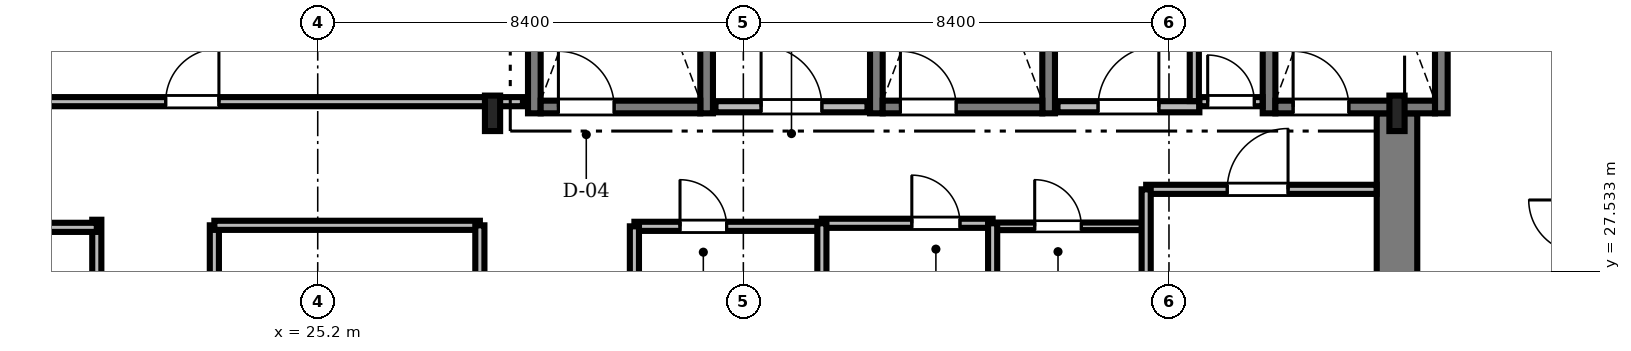
"""IFC4 building model, lengths in metres.
Left out: names, types, materials, properties, quantities, classifications, styles, units other than length and angle.
Written with IfcOpenShell. Run it as: python <this file> out.ifc"""

import sys

from ifc_helpers import new_model, si_unit, direction, frame, frame_2d, origin, origin_2d, place, context, subcontext, project, spatial, rectangle, i_section, extrude, source, transform, mapped, element, fill, save


model = new_model("IFC4")
c1 = context("Model", 3, precision=1e-05, world=origin(), true_north=direction((0.0, 1.0)))
c2 = subcontext(c1, "Body", "Model", "MODEL_VIEW")
j1 = project(units=[si_unit("LENGTHUNIT", "METRE"), si_unit("PLANEANGLEUNIT", "RADIAN")], contexts=[c1])
p1 = place(None, origin())
s1 = spatial("IfcSite", under=j1, at=p1, CompositionType="ELEMENT")
p2 = place(p1, origin())
s2 = spatial("IfcBuilding", under=s1, at=p2, CompositionType="ELEMENT")
p3 = place(p2, frame((0.0, 0.0, 218.55)))
s3 = spatial("IfcBuildingStorey", under=s2, at=p3, CompositionType="ELEMENT", Elevation=218.55)
m1 = source(origin(), c2, "Body", "SweptSolid", [
    extrude(rectangle(XDim=13.15, YDim=0.8, at=frame_2d((6.575, 0.0))), origin(), (0.0, 0.0, 1.0), 3.53),
])
p4 = place(p3, frame((46.5, 17.5, 0.0), z_axis=(0.0, 0.0, 1.0), x_axis=(0.0, 1.0, 0.0)))
e1 = element("IfcWall", 1, at=p4, inside=s3, PredefinedType="SHEAR", context=c2, shape_type="MappedRepresentation", body=[
    mapped(m1, transform((0.0, 0.0, 0.0), scale=1.0)),
])
m2 = source(origin(), c2, "Body", "SweptSolid", [
    extrude(i_section(OverallWidth=0.3, OverallDepth=0.7, WebThickness=0.017, FlangeThickness=0.032, FilletRadius=0.027, at=origin_2d()), origin(), (0.0, 0.0, 1.0), 3.53),
])
for number, where, z_axis, x_axis in (
    (2, (28.65, 30.65, 0.0), (0.0, 0.0, 1.0), (1.0, 0.0, 0.0)),
    (3, (46.5, 30.65, 0.0), (0.0, 0.0, 1.0), (1.0, 0.0, 0.0)),
):
    element("IfcColumn", number, at=place(p3, frame(where, z_axis=z_axis, x_axis=x_axis)), inside=s3, PredefinedType="COLUMN", context=c2, shape_type="MappedRepresentation", body=[
        mapped(m2, transform((0.0, 0.0, 0.0), scale=1.0)),
    ])
m3 = source(origin(), c2, "Body", "SweptSolid", [
    extrude(rectangle(XDim=9.25, YDim=0.25, at=frame_2d((4.625, 0.0))), origin(), (0.0, 0.0, 1.0), 3.55),
])
for number, where, z_axis, x_axis in (
    (4, (29.475, 30.65, 0.0), (0.0, 0.0, 1.0), (0.0, 1.0, 0.0)),
    (5, (32.875, 30.65, 0.0), (0.0, 0.0, 1.0), (0.0, 1.0, 0.0)),
):
    element("IfcWall", number, at=place(p3, frame(where, z_axis=z_axis, x_axis=x_axis)), inside=s3, PredefinedType="SOLIDWALL", context=c2, shape_type="MappedRepresentation", body=[
        mapped(m3, transform((0.0, 0.0, 0.0), scale=1.0)),
    ])
m4 = source(origin(), c2, "Body", "SweptSolid", [
    extrude(rectangle(XDim=3.15, YDim=0.25, at=frame_2d((1.575, 0.0))), origin(), (0.0, 0.0, 1.0), 3.55),
])
p5 = place(p3, frame((29.6, 30.775, 0.0), z_axis=(0.0, 0.0, 1.0), x_axis=(1.0, 0.0, 0.0)))
e6 = element("IfcWall", 6, at=p5, inside=s3, PredefinedType="SOLIDWALL", context=c2, shape_type="MappedRepresentation", body=[
    mapped(m4, transform((0.0, 0.0, 0.0), scale=1.0)),
])
m5 = source(origin(), c2, "Body", "SweptSolid", [
    extrude(rectangle(XDim=1.1, YDim=2.2, at=frame_2d((0.55, 1.1))), frame((0.0, 0.135, 0.0), z_axis=(0.0, -1.0, 0.0), x_axis=(1.0, 0.0, 0.0)), (0.0, 0.0, 1.0), 0.27),
])
p6 = place(p5, frame((0.35, 0.0, 0.0)))
e7 = element("IfcOpeningElement", 7, at=p6, cuts=e6, PredefinedType="OPENING", context=c2, shape_type="MappedRepresentation", body=[
    mapped(m5, transform((0.0, 0.0, 0.0), scale=1.0)),
])
for number, where, z_axis, x_axis in (
    (8, (36.225, 30.65, 0.0), (0.0, 0.0, 1.0), (0.0, 1.0, 0.0)),
    (9, (39.625, 30.65, 0.0), (0.0, 0.0, 1.0), (0.0, 1.0, 0.0)),
):
    element("IfcWall", number, at=place(p3, frame(where, z_axis=z_axis, x_axis=x_axis)), inside=s3, PredefinedType="SOLIDWALL", context=c2, shape_type="MappedRepresentation", body=[
        mapped(m3, transform((0.0, 0.0, 0.0), scale=1.0)),
    ])
p7 = place(p3, frame((36.35, 30.775, 0.0), z_axis=(0.0, 0.0, 1.0), x_axis=(1.0, 0.0, 0.0)))
e10 = element("IfcWall", 10, at=p7, inside=s3, PredefinedType="SOLIDWALL", context=c2, shape_type="MappedRepresentation", body=[
    mapped(m4, transform((0.0, 0.0, 0.0), scale=1.0)),
])
p8 = place(p7, frame((0.35, 0.0, 0.0)))
e11 = element("IfcOpeningElement", 11, at=p8, cuts=e10, PredefinedType="OPENING", context=c2, shape_type="MappedRepresentation", body=[
    mapped(m5, transform((0.0, 0.0, 0.0), scale=1.0)),
])
for number, where, z_axis, x_axis in (
    (12, (43.975, 30.65, 0.0), (0.0, 0.0, 1.0), (0.0, 1.0, 0.0)),
    (13, (47.375, 30.65, 0.0), (0.0, 0.0, 1.0), (0.0, 1.0, 0.0)),
):
    element("IfcWall", number, at=place(p3, frame(where, z_axis=z_axis, x_axis=x_axis)), inside=s3, PredefinedType="SOLIDWALL", context=c2, shape_type="MappedRepresentation", body=[
        mapped(m3, transform((0.0, 0.0, 0.0), scale=1.0)),
    ])
p9 = place(p3, frame((44.1, 30.775, 0.0), z_axis=(0.0, 0.0, 1.0), x_axis=(1.0, 0.0, 0.0)))
e14 = element("IfcWall", 14, at=p9, inside=s3, PredefinedType="SOLIDWALL", context=c2, shape_type="MappedRepresentation", body=[
    mapped(m4, transform((0.0, 0.0, 0.0), scale=1.0)),
])
p10 = place(p9, frame((0.35, 0.0, 0.0)))
e15 = element("IfcOpeningElement", 15, at=p10, cuts=e14, PredefinedType="OPENING", context=c2, shape_type="MappedRepresentation", body=[
    mapped(m5, transform((0.0, 0.0, 0.0), scale=1.0)),
])
m6 = source(origin(), c2, "Body", "SweptSolid", [
    extrude(rectangle(XDim=3.0, YDim=0.22, at=frame_2d((1.5, 0.0))), origin(), (0.0, 0.0, 1.0), 3.53),
])
p11 = place(p3, frame((33.05, 30.78, 0.0), z_axis=(0.0, 0.0, 1.0), x_axis=(1.0, 0.0, 0.0)))
e16 = element("IfcWall", 16, at=p11, inside=s3, PredefinedType="SOLIDWALL", context=c2, shape_type="MappedRepresentation", body=[
    mapped(m6, transform((0.0, 0.0, 0.0), scale=1.0)),
])
m7 = source(origin(), c2, "Body", "SweptSolid", [
    extrude(rectangle(XDim=1.2, YDim=2.2, at=frame_2d((0.6, 1.1))), frame((0.0, 0.12, 0.0), z_axis=(0.0, -1.0, 0.0), x_axis=(1.0, 0.0, 0.0)), (0.0, 0.0, 1.0), 0.24),
])
p12 = place(p11, frame((0.9, 0.0, 0.0)))
e17 = element("IfcOpeningElement", 17, at=p12, cuts=e16, PredefinedType="OPENING", context=c2, shape_type="MappedRepresentation", body=[
    mapped(m7, transform((0.0, 0.0, 0.0), scale=1.0)),
])
m8 = source(origin(), c2, "Body", "SweptSolid", [
    extrude(rectangle(XDim=2.8, YDim=0.22, at=frame_2d((1.4, 0.0))), origin(), (0.0, 0.0, 1.0), 3.53),
])
p13 = place(p3, frame((39.8, 30.78, 0.0), z_axis=(0.0, 0.0, 1.0), x_axis=(1.0, 0.0, 0.0)))
e18 = element("IfcWall", 18, at=p13, inside=s3, PredefinedType="SOLIDWALL", context=c2, shape_type="MappedRepresentation", body=[
    mapped(m8, transform((0.0, 0.0, 0.0), scale=1.0)),
])
p14 = place(p13, frame((0.8, 0.0, 0.0)))
e19 = element("IfcOpeningElement", 19, at=p14, cuts=e18, PredefinedType="OPENING", context=c2, shape_type="MappedRepresentation", body=[
    mapped(m7, transform((0.0, 0.0, 0.0), scale=1.0)),
])
m9 = source(origin(), c2, "Body", "SweptSolid", [
    extrude(rectangle(XDim=17.828, YDim=0.18, at=frame_2d((8.914, 0.0))), origin(), (0.0, 0.0, 1.0), 2.772),
])
p15 = place(p3, frame((11.422, 30.88, 0.0), z_axis=(0.0, 0.0, 1.0), x_axis=(1.0, 0.0, 0.0)))
e20 = element("IfcWall", 20, at=p15, inside=s3, PredefinedType="PARTITIONING", context=c2, shape_type="MappedRepresentation", body=[
    mapped(m9, transform((0.0, 0.0, 0.0), scale=1.0)),
])
m10 = source(origin(), c2, "Body", "SweptSolid", [
    extrude(rectangle(XDim=1.05, YDim=2.2, at=frame_2d((0.525, 1.1))), frame((0.0, 0.1, 0.0), z_axis=(0.0, -1.0, 0.0), x_axis=(1.0, 0.0, 0.0)), (0.0, 0.0, 1.0), 0.2),
])
p16 = place(p15, frame((10.778, 0.0, 0.0)))
e21 = element("IfcOpeningElement", 21, at=p16, cuts=e20, PredefinedType="OPENING", context=c2, shape_type="MappedRepresentation", body=[
    mapped(m10, transform((0.0, 0.0, 0.0), scale=1.0)),
])
m11 = source(origin(), c2, "Body", "SweptSolid", [
    extrude(rectangle(XDim=14.98, YDim=0.18, at=frame_2d((7.49, 0.0))), origin(), (0.0, 0.0, 1.0), 2.972),
])
p17 = place(p3, frame((20.84, 13.57, 0.0), z_axis=(0.0, 0.0, 1.0), x_axis=(0.0, 1.0, 0.0)))
e22 = element("IfcWall", 22, at=p17, inside=s3, PredefinedType="PARTITIONING", context=c2, shape_type="MappedRepresentation", body=[
    mapped(m11, transform((0.0, 0.0, 0.0), scale=1.0)),
])
p18 = place(p17, frame((1.952, 0.0, 0.0)))
e23 = element("IfcOpeningElement", 23, at=p18, cuts=e22, PredefinedType="OPENING", context=c2, shape_type="MappedRepresentation", body=[
    mapped(m10, transform((0.0, 0.0, 0.0), scale=1.0)),
])
m12 = source(origin(), c2, "Body", "SweptSolid", [
    extrude(rectangle(XDim=0.95, YDim=2.15, at=frame_2d((0.475, 1.075))), frame((0.0, 0.1, 0.0), z_axis=(0.0, -1.0, 0.0), x_axis=(1.0, 0.0, 0.0)), (0.0, 0.0, 1.0), 0.2),
])
p19 = place(p17, frame((8.12, 0.0, 0.0)))
e24 = element("IfcOpeningElement", 24, at=p19, cuts=e22, PredefinedType="OPENING", context=c2, shape_type="MappedRepresentation", body=[
    mapped(m12, transform((0.0, 0.0, 0.0), scale=1.0)),
])
p20 = place(p17, frame((11.838, 0.0, 0.0)))
e25 = element("IfcOpeningElement", 25, at=p20, cuts=e22, PredefinedType="OPENING", context=c2, shape_type="MappedRepresentation", body=[
    mapped(m10, transform((0.0, 0.0, 0.0), scale=1.0)),
])
m13 = source(origin(), c2, "Body", "SweptSolid", [
    extrude(rectangle(XDim=4.548, YDim=0.18, at=frame_2d((2.274, 0.0))), origin(), (0.0, 0.0, 1.0), 3.162),
])
p21 = place(p3, frame((41.55, 29.15, 0.0), z_axis=(0.0, 0.0, 1.0), x_axis=(1.0, 0.0, 0.0)))
e26 = element("IfcWall", 26, at=p21, inside=s3, PredefinedType="PARTITIONING", context=c2, shape_type="MappedRepresentation", body=[
    mapped(m13, transform((0.0, 0.0, 0.0), scale=1.0)),
])
m14 = source(origin(), c2, "Body", "SweptSolid", [
    extrude(rectangle(XDim=1.2, YDim=2.2, at=frame_2d((0.6, 1.1))), frame((0.0, 0.1, 0.0), z_axis=(0.0, -1.0, 0.0), x_axis=(1.0, 0.0, 0.0)), (0.0, 0.0, 1.0), 0.2),
])
p22 = place(p21, frame((1.6, 0.0, 0.0)))
e27 = element("IfcOpeningElement", 27, at=p22, cuts=e26, PredefinedType="OPENING", context=c2, shape_type="MappedRepresentation", body=[
    mapped(m14, transform((0.0, 0.0, 0.0), scale=1.0)),
])
m15 = source(origin(), c2, "Body", "SweptSolid", [
    extrude(rectangle(XDim=4.24, YDim=0.18, at=frame_2d((2.12, 0.0))), origin(), (0.0, 0.0, 1.0), 2.972),
])
p23 = place(p3, frame((23.16, 24.2, 0.0), z_axis=(0.0, 0.0, 1.0), x_axis=(0.0, 1.0, 0.0)))
e28 = element("IfcWall", 28, at=p23, inside=s3, PredefinedType="PARTITIONING", context=c2, shape_type="MappedRepresentation", body=[
    mapped(m15, transform((0.0, 0.0, 0.0), scale=1.0)),
])
p24 = place(p23, frame((1.4, 0.0, 0.0)))
e29 = element("IfcOpeningElement", 29, at=p24, cuts=e28, PredefinedType="OPENING", context=c2, shape_type="MappedRepresentation", body=[
    mapped(m10, transform((0.0, 0.0, 0.0), scale=1.0)),
])
m16 = source(origin(), c2, "Body", "SweptSolid", [
    extrude(rectangle(XDim=3.7, YDim=0.18, at=frame_2d((1.85, 0.0))), origin(), (0.0, 0.0, 1.0), 3.162),
])
p25 = place(p3, frame((31.45, 28.42, 0.0), z_axis=(0.0, 0.0, 1.0), x_axis=(1.0, 0.0, 0.0)))
e30 = element("IfcWall", 30, at=p25, inside=s3, PredefinedType="PARTITIONING", context=c2, shape_type="MappedRepresentation", body=[
    mapped(m16, transform((0.0, 0.0, 0.0), scale=1.0)),
])
m17 = source(origin(), c2, "Body", "SweptSolid", [
    extrude(rectangle(XDim=0.92, YDim=2.1, at=frame_2d((0.46, 1.05))), frame((0.0, 0.1, 0.0), z_axis=(0.0, -1.0, 0.0), x_axis=(1.0, 0.0, 0.0)), (0.0, 0.0, 1.0), 0.2),
])
p26 = place(p25, frame((0.9, 0.0, 0.0)))
e31 = element("IfcOpeningElement", 31, at=p26, cuts=e30, PredefinedType="OPENING", context=c2, shape_type="MappedRepresentation", body=[
    mapped(m17, transform((0.0, 0.0, 0.0), scale=1.0)),
])
m18 = source(origin(), c2, "Body", "SweptSolid", [
    extrude(rectangle(XDim=3.37, YDim=0.18, at=frame_2d((1.685, 0.0))), origin(), (0.0, 0.0, 1.0), 3.53),
])
p27 = place(p3, frame((35.15, 28.48, 0.0), z_axis=(0.0, 0.0, 1.0), x_axis=(1.0, 0.0, 0.0)))
e32 = element("IfcWall", 32, at=p27, inside=s3, PredefinedType="PARTITIONING", context=c2, shape_type="MappedRepresentation", body=[
    mapped(m18, transform((0.0, 0.0, 0.0), scale=1.0)),
])
p28 = place(p27, frame((1.775, 0.0, 0.0)))
e33 = element("IfcOpeningElement", 33, at=p28, cuts=e32, PredefinedType="OPENING", context=c2, shape_type="MappedRepresentation", body=[
    mapped(m12, transform((0.0, 0.0, 0.0), scale=1.0)),
])
m19 = source(origin(), c2, "Body", "SweptSolid", [
    extrude(rectangle(XDim=3.0, YDim=0.15, at=frame_2d((1.5, 0.0))), origin(), (0.0, 0.0, 1.0), 3.53),
])
p29 = place(p3, frame((38.52, 28.42, 0.0), z_axis=(0.0, 0.0, 1.0), x_axis=(1.0, 0.0, 0.0)))
e34 = element("IfcWall", 34, at=p29, inside=s3, PredefinedType="PARTITIONING", context=c2, shape_type="MappedRepresentation", body=[
    mapped(m19, transform((0.0, 0.0, 0.0), scale=1.0)),
])
m20 = source(origin(), c2, "Body", "SweptSolid", [
    extrude(rectangle(XDim=0.92, YDim=2.1, at=frame_2d((0.46, 1.05))), frame((0.0, 0.085, 0.0), z_axis=(0.0, -1.0, 0.0), x_axis=(1.0, 0.0, 0.0)), (0.0, 0.0, 1.0), 0.17),
])
p30 = place(p29, frame((0.83, 0.0, 0.0)))
e35 = element("IfcOpeningElement", 35, at=p30, cuts=e34, PredefinedType="OPENING", context=c2, shape_type="MappedRepresentation", body=[
    mapped(m20, transform((0.0, 0.0, 0.0), scale=1.0)),
])
m21 = source(origin(), c2, "Body", "SweptSolid", [
    extrude(rectangle(XDim=1.248, YDim=0.18, at=frame_2d((0.624, 0.0))), origin(), (0.0, 0.0, 1.0), 3.53),
])
p31 = place(p3, frame((42.6, 30.88, 0.0), z_axis=(0.0, 0.0, 1.0), x_axis=(1.0, 0.0, 0.0)))
e36 = element("IfcWall", 36, at=p31, inside=s3, PredefinedType="PARTITIONING", context=c2, shape_type="MappedRepresentation", body=[
    mapped(m21, transform((0.0, 0.0, 0.0), scale=1.0)),
])
p32 = place(p31, frame((0.164, 0.0, 0.0)))
e37 = element("IfcOpeningElement", 37, at=p32, cuts=e36, PredefinedType="OPENING", context=c2, shape_type="MappedRepresentation", body=[
    mapped(m17, transform((0.0, 0.0, 0.0), scale=1.0)),
])
m22 = source(origin(), c2, "Body", "SweptSolid", [
    extrude(rectangle(XDim=9.61, YDim=0.18, at=frame_2d((4.805, 0.0))), origin(), (0.0, 0.0, 1.0), 2.772),
])
p33 = place(p3, frame((11.23, 28.4, 0.0), z_axis=(0.0, 0.0, 1.0), x_axis=(1.0, 0.0, 0.0)))
e38 = element("IfcWall", 38, at=p33, inside=s3, PredefinedType="PARTITIONING", context=c2, shape_type="MappedRepresentation", body=[
    mapped(m22, transform((0.0, 0.0, 0.0), scale=1.0)),
])
m23 = source(origin(), c2, "Body", "SweptSolid", [
    extrude(rectangle(XDim=5.24, YDim=0.18, at=frame_2d((2.62, 0.0))), origin(), (0.0, 0.0, 1.0), 3.53),
])
p34 = place(p3, frame((23.16, 28.44, 0.0), z_axis=(0.0, 0.0, 1.0), x_axis=(1.0, 0.0, 0.0)))
e39 = element("IfcWall", 39, at=p34, inside=s3, PredefinedType="PARTITIONING", context=c2, shape_type="MappedRepresentation", body=[
    mapped(m23, transform((0.0, 0.0, 0.0), scale=1.0)),
])
p35 = place(p3, frame((28.4, 24.2, 0.0), z_axis=(0.0, 0.0, 1.0), x_axis=(0.0, 1.0, 0.0)))
e40 = element("IfcWall", 40, at=p35, inside=s3, PredefinedType="PARTITIONING", context=c2, shape_type="MappedRepresentation", body=[
    mapped(m15, transform((0.0, 0.0, 0.0), scale=1.0)),
])
m24 = source(origin(), c2, "Body", "SweptSolid", [
    extrude(rectangle(XDim=2.35, YDim=0.18, at=frame_2d((1.175, 0.0))), origin(), (0.0, 0.0, 1.0), 2.972),
])
p36 = place(p3, frame((41.55, 26.8, 0.0), z_axis=(0.0, 0.0, 1.0), x_axis=(0.0, 1.0, 0.0)))
e41 = element("IfcWall", 41, at=p36, inside=s3, PredefinedType="PARTITIONING", context=c2, shape_type="MappedRepresentation", body=[
    mapped(m24, transform((0.0, 0.0, 0.0), scale=1.0)),
])
m25 = source(origin(), c2, "Body", "SweptSolid", [
    extrude(rectangle(XDim=1.858, YDim=0.18, at=frame_2d((0.929, 0.0))), origin(), (0.0, 0.0, 1.0), 3.53),
])
p37 = place(p3, frame((42.5, 30.892, 0.0), z_axis=(0.0, 0.0, 1.0), x_axis=(0.0, 1.0, 0.0)))
e42 = element("IfcWall", 42, at=p37, inside=s3, PredefinedType="PARTITIONING", context=c2, shape_type="MappedRepresentation", body=[
    mapped(m25, transform((0.0, 0.0, 0.0), scale=1.0)),
])
m26 = source(origin(), c2, "Body", "SweptSolid", [
    extrude(rectangle(XDim=1.66, YDim=0.18, at=frame_2d((0.83, 0.0))), origin(), (0.0, 0.0, 1.0), 3.072),
])
for number, where, z_axis, x_axis in (
    (43, (35.15, 26.82, 0.0), (0.0, 0.0, 1.0), (0.0, 1.0, 0.0)),
    (44, (38.52, 26.82, 0.0), (0.0, 0.0, 1.0), (0.0, 1.0, 0.0)),
):
    element("IfcWall", number, at=place(p3, frame(where, z_axis=z_axis, x_axis=x_axis)), inside=s3, PredefinedType="PARTITIONING", context=c2, shape_type="MappedRepresentation", body=[
        mapped(m26, transform((0.0, 0.0, 0.0), scale=1.0)),
    ])
m27 = source(origin(), c2, "Body", "SweptSolid", [
    extrude(rectangle(XDim=1.6, YDim=0.18, at=frame_2d((0.8, 0.0))), origin(), (0.0, 0.0, 1.0), 3.072),
])
p38 = place(p3, frame((31.45, 26.82, 0.0), z_axis=(0.0, 0.0, 1.0), x_axis=(0.0, 1.0, 0.0)))
e45 = element("IfcWall", 45, at=p38, inside=s3, PredefinedType="PARTITIONING", context=c2, shape_type="MappedRepresentation", body=[
    mapped(m27, transform((0.0, 0.0, 0.0), scale=1.0)),
])
m28 = source(origin(), c2, "Body", "SweptSolid", [
    extrude(rectangle(XDim=1.1, YDim=2.2, at=frame_2d((0.55, 1.1))), frame((0.0, 0.025, 0.0), z_axis=(0.0, -1.0, 0.0), x_axis=(1.0, 0.0, 0.0)), (0.0, 0.0, 1.0), 0.05),
])
p39 = place(p6, origin())
e46 = element("IfcDoor", 46, at=p39, inside=s3, OperationType="SINGLE_SWING_LEFT", PredefinedType="DOOR", context=c2, shape_type="MappedRepresentation", body=[
    mapped(m28, transform((0.0, 0.0, 0.0), scale=1.0)),
])
fill(e7, e46)
p40 = place(p8, origin())
e47 = element("IfcDoor", 47, at=p40, inside=s3, OperationType="SINGLE_SWING_LEFT", PredefinedType="DOOR", context=c2, shape_type="MappedRepresentation", body=[
    mapped(m28, transform((0.0, 0.0, 0.0), scale=1.0)),
])
fill(e11, e47)
p41 = place(p10, origin())
e48 = element("IfcDoor", 48, at=p41, inside=s3, OperationType="SINGLE_SWING_LEFT", PredefinedType="DOOR", context=c2, shape_type="MappedRepresentation", body=[
    mapped(m28, transform((0.0, 0.0, 0.0), scale=1.0)),
])
fill(e15, e48)
m29 = source(origin(), c2, "Body", "SweptSolid", [
    extrude(rectangle(XDim=1.2, YDim=2.2, at=frame_2d((0.6, 1.1))), frame((0.0, 0.025, 0.0), z_axis=(0.0, -1.0, 0.0), x_axis=(1.0, 0.0, 0.0)), (0.0, 0.0, 1.0), 0.05),
])
p42 = place(p12, origin())
e49 = element("IfcDoor", 49, at=p42, inside=s3, OperationType="SINGLE_SWING_LEFT", PredefinedType="DOOR", context=c2, shape_type="MappedRepresentation", body=[
    mapped(m29, transform((0.0, 0.0, 0.0), scale=1.0)),
])
fill(e17, e49)
p43 = place(p14, origin())
e50 = element("IfcDoor", 50, at=p43, inside=s3, OperationType="SINGLE_SWING_RIGHT", PredefinedType="DOOR", context=c2, shape_type="MappedRepresentation", body=[
    mapped(m29, transform((0.0, 0.0, 0.0), scale=1.0)),
])
fill(e19, e50)
m30 = source(origin(), c2, "Body", "SweptSolid", [
    extrude(rectangle(XDim=1.05, YDim=2.2, at=frame_2d((0.525, 1.1))), frame((0.0, 0.025, 0.0), z_axis=(0.0, -1.0, 0.0), x_axis=(1.0, 0.0, 0.0)), (0.0, 0.0, 1.0), 0.05),
])
p44 = place(p16, origin())
e51 = element("IfcDoor", 51, at=p44, inside=s3, OperationType="SINGLE_SWING_RIGHT", PredefinedType="DOOR", context=c2, shape_type="MappedRepresentation", body=[
    mapped(m30, transform((0.0, 0.0, 0.0), scale=1.0)),
])
fill(e21, e51)
p45 = place(p22, origin())
e52 = element("IfcDoor", 52, at=p45, inside=s3, OperationType="SINGLE_SWING_RIGHT", PredefinedType="DOOR", context=c2, shape_type="MappedRepresentation", body=[
    mapped(m29, transform((0.0, 0.0, 0.0), scale=1.0)),
])
fill(e27, e52)
m31 = source(origin(), c2, "Body", "SweptSolid", [
    extrude(rectangle(XDim=0.92, YDim=2.1, at=frame_2d((0.46, 1.05))), frame((0.0, 0.025, 0.0), z_axis=(0.0, -1.0, 0.0), x_axis=(1.0, 0.0, 0.0)), (0.0, 0.0, 1.0), 0.05),
])
p46 = place(p26, origin())
e53 = element("IfcDoor", 53, at=p46, inside=s3, OperationType="SINGLE_SWING_LEFT", PredefinedType="DOOR", context=c2, shape_type="MappedRepresentation", body=[
    mapped(m31, transform((0.0, 0.0, 0.0), scale=1.0)),
])
fill(e31, e53)
m32 = source(origin(), c2, "Body", "SweptSolid", [
    extrude(rectangle(XDim=0.95, YDim=2.15, at=frame_2d((0.475, 1.075))), frame((0.0, 0.025, 0.0), z_axis=(0.0, -1.0, 0.0), x_axis=(1.0, 0.0, 0.0)), (0.0, 0.0, 1.0), 0.05),
])
p47 = place(p28, origin())
e54 = element("IfcDoor", 54, at=p47, inside=s3, OperationType="SINGLE_SWING_LEFT", PredefinedType="DOOR", context=c2, shape_type="MappedRepresentation", body=[
    mapped(m32, transform((0.0, 0.0, 0.0), scale=1.0)),
])
fill(e33, e54)
p48 = place(p30, origin())
e55 = element("IfcDoor", 55, at=p48, inside=s3, OperationType="SINGLE_SWING_LEFT", PredefinedType="DOOR", context=c2, shape_type="MappedRepresentation", body=[
    mapped(m31, transform((0.0, 0.0, 0.0), scale=1.0)),
])
fill(e35, e55)
p49 = place(p32, origin())
e56 = element("IfcDoor", 56, at=p49, inside=s3, OperationType="SINGLE_SWING_LEFT", PredefinedType="DOOR", context=c2, shape_type="MappedRepresentation", body=[
    mapped(m31, transform((0.0, 0.0, 0.0), scale=1.0)),
])
fill(e37, e56)
save(model, sys.argv[1])
